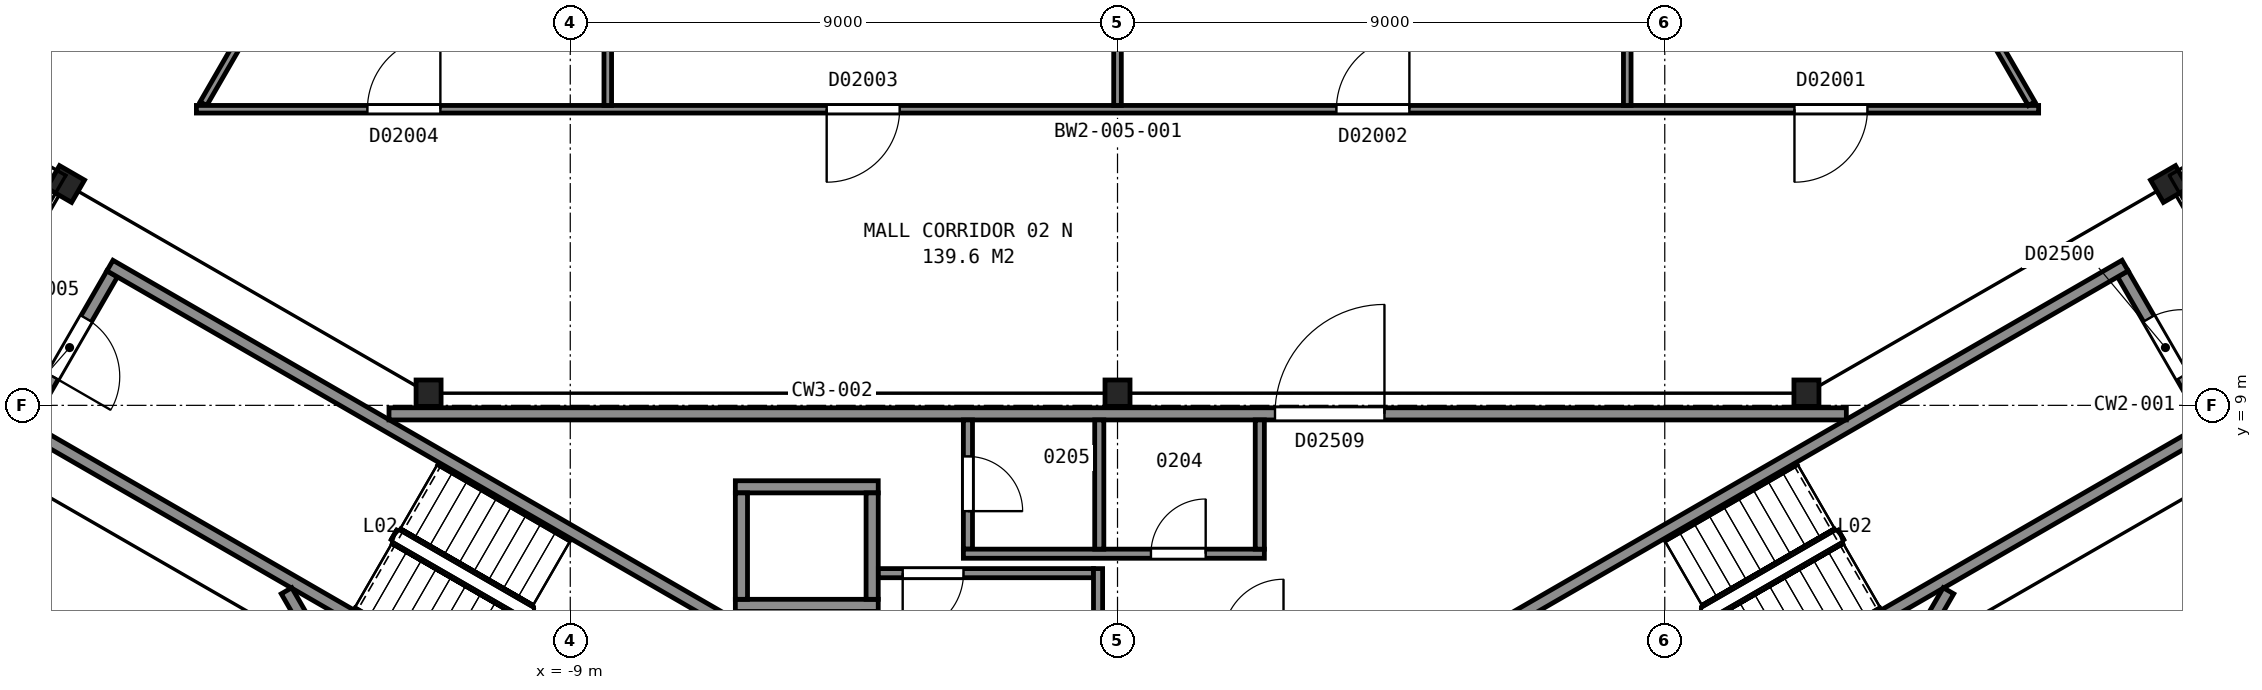
"""IFC4 building model, lengths in metres.
Left out: names, types, materials, properties, quantities, classifications, styles, units other than length and angle.
Written with IfcOpenShell. Run it as: python <this file> out.ifc"""

import sys

from ifc_helpers import new_model, si_unit, direction, frame, frame_2d, origin, origin_2d, place, context, subcontext, project, spatial, rectangle, i_section, extrude, element, fill, save


model = new_model("IFC4")
c1 = context("Model", 3, precision=1e-05, world=origin(), true_north=direction((0.0, 1.0)))
c2 = subcontext(c1, "Body", "Model", "MODEL_VIEW")
j1 = project(units=[si_unit("LENGTHUNIT", "METRE"), si_unit("PLANEANGLEUNIT", "RADIAN")], contexts=[c1])
p1 = place(None, origin())
s1 = spatial("IfcSite", under=j1, at=p1, CompositionType="ELEMENT")
p2 = place(p1, origin())
s2 = spatial("IfcBuilding", under=s1, at=p2, CompositionType="ELEMENT")
p3 = place(p2, frame((0.0, 0.0, 17.4)))
s3 = spatial("IfcBuildingStorey", under=s2, at=p3, CompositionType="ELEMENT", Elevation=17.4)
p4 = place(p3, frame((17.3, 12.64, 0.0), z_axis=(0.0, 0.0, 1.0), x_axis=(0.5, -0.866025403784, 0.0)))
e1 = element("IfcColumn", 1, at=p4, inside=s3, PredefinedType="COLUMN", context=c2, shape_type="SweptSolid", body=[
    extrude(i_section(OverallWidth=0.424, OverallDepth=0.475, WebThickness=0.048, FlangeThickness=0.077, FilletRadius=0.015, at=origin_2d()), origin(), (0.0, 0.0, 1.0), 5.0),
])
for number, where, z_axis, x_axis in (
    (2, (11.33, 9.2, 0.0), (0.0, 0.0, 1.0), (1.0, 0.0, 0.0)),
    (3, (0.0, 9.2, 0.0), (0.0, 0.0, 1.0), (1.0, 0.0, 0.0)),
    (4, (-11.33, 9.2, 0.0), (0.0, 0.0, 1.0), (1.0, 0.0, 0.0)),
):
    element("IfcColumn", number, at=place(p3, frame(where, z_axis=z_axis, x_axis=x_axis)), inside=s3, PredefinedType="COLUMN", context=c2, shape_type="SweptSolid", body=[
        extrude(i_section(OverallWidth=0.411, OverallDepth=0.434, WebThickness=0.036, FlangeThickness=0.057, FilletRadius=0.015, at=origin_2d()), origin(), (0.0, 0.0, 1.0), 5.0),
    ])
p5 = place(p3, frame((-17.3, 12.64, 0.0), z_axis=(0.0, 0.0, 1.0), x_axis=(0.5, 0.866025403784, 0.0)))
e5 = element("IfcColumn", 5, at=p5, inside=s3, PredefinedType="COLUMN", context=c2, shape_type="SweptSolid", body=[
    extrude(i_section(OverallWidth=0.424, OverallDepth=0.475, WebThickness=0.048, FlangeThickness=0.077, FilletRadius=0.015, at=origin_2d()), origin(), (0.0, 0.0, 1.0), 5.0),
])
p6 = place(p3, frame((17.934, 8.738, 0.0), z_axis=(0.0, 0.0, 1.0), x_axis=(-0.49998411664, 0.866034573852, 0.0)))
e6 = element("IfcWall", 6, at=p6, inside=s3, PredefinedType="PARTITIONING", context=c2, shape_type="SweptSolid", body=[
    extrude(rectangle(XDim=2.8, YDim=0.2, at=frame_2d((1.4, 0.0))), origin(), (0.0, 0.0, 1.0), 4.75),
])
p7 = place(p6, frame((0.85, 0.0, 0.0)))
e7 = element("IfcOpeningElement", 7, at=p7, cuts=e6, PredefinedType="OPENING", context=c2, shape_type="SweptSolid", body=[
    extrude(rectangle(XDim=1.1, YDim=2.1, at=frame_2d((0.55, 1.05))), frame((0.0, 0.11, 0.0), z_axis=(0.0, -1.0, 0.0), x_axis=(1.0, 0.0, 0.0)), (0.0, 0.0, 1.0), 0.22),
])
for number, where, z_axis, x_axis in (
    (8, (6.178, 5.299, 0.0), (0.0, 0.0, 1.0), (0.866, 0.5, 0.0)),
    (9, (7.678, 2.701, 0.0), (0.0, 0.0, 1.0), (0.866, 0.5, 0.0)),
):
    element("IfcWall", number, at=place(p3, frame(where, z_axis=z_axis, x_axis=x_axis)), inside=s3, PredefinedType="PARTITIONING", context=c2, shape_type="SweptSolid", body=[
        extrude(rectangle(XDim=12.0, YDim=0.2, at=frame_2d((6.0, 0.0))), origin(), (0.0, 0.0, 1.0), 4.75),
    ])
p8 = place(p3, frame((-16.534, 11.162, 0.0), z_axis=(0.0, 0.0, 1.0), x_axis=(-0.49998411664, -0.866034573852, 0.0)))
e10 = element("IfcWall", 10, at=p8, inside=s3, PredefinedType="PARTITIONING", context=c2, shape_type="SweptSolid", body=[
    extrude(rectangle(XDim=2.8, YDim=0.2, at=frame_2d((1.4, 0.0))), origin(), (0.0, 0.0, 1.0), 4.75),
])
p9 = place(p8, frame((0.85, 0.0, 0.0)))
e11 = element("IfcOpeningElement", 11, at=p9, cuts=e10, PredefinedType="OPENING", context=c2, shape_type="SweptSolid", body=[
    extrude(rectangle(XDim=1.1, YDim=2.1, at=frame_2d((0.55, 1.05))), frame((0.0, 0.11, 0.0), z_axis=(0.0, -1.0, 0.0), x_axis=(1.0, 0.0, 0.0)), (0.0, 0.0, 1.0), 0.22),
])
for number, where, z_axis, x_axis in (
    (12, (-7.678, 2.701, 0.0), (0.0, 0.0, 1.0), (-0.866, 0.5, 0.0)),
    (13, (-6.178, 5.299, 0.0), (0.0, 0.0, 1.0), (-0.866, 0.5, 0.0)),
):
    element("IfcWall", number, at=place(p3, frame(where, z_axis=z_axis, x_axis=x_axis)), inside=s3, PredefinedType="PARTITIONING", context=c2, shape_type="SweptSolid", body=[
        extrude(rectangle(XDim=12.0, YDim=0.2, at=frame_2d((6.0, 0.0))), origin(), (0.0, 0.0, 1.0), 4.75),
    ])
for number, where, z_axis, x_axis in (
    (14, (-6.285, 5.71, 0.0), (0.0, 0.0, 1.0), (1.0, 0.0, 0.0)),
    (15, (-6.285, 7.66, 0.0), (0.0, 0.0, 1.0), (1.0, 0.0, 0.0)),
):
    element("IfcWall", number, at=place(p3, frame(where, z_axis=z_axis, x_axis=x_axis)), inside=s3, PredefinedType="PARTITIONING", context=c2, shape_type="SweptSolid", body=[
        extrude(rectangle(XDim=2.35, YDim=0.2, at=frame_2d((1.175, 0.0))), origin(), (0.0, 0.0, 1.0), 5.0),
    ])
for number, where, z_axis, x_axis in (
    (16, (-4.035, 5.81, 0.0), (0.0, 0.0, 1.0), (0.0, 1.0, 0.0)),
    (17, (-6.185, 5.81, 0.0), (0.0, 0.0, 1.0), (0.0, 1.0, 0.0)),
):
    element("IfcWall", number, at=place(p3, frame(where, z_axis=z_axis, x_axis=x_axis)), inside=s3, PredefinedType="PARTITIONING", context=c2, shape_type="SweptSolid", body=[
        extrude(rectangle(XDim=1.75, YDim=0.2, at=frame_2d((0.875, 0.0))), origin(), (0.0, 0.0, 1.0), 5.0),
    ])
p10 = place(p3, frame((-13.666, 5.95, 0.0), z_axis=(0.0, 0.0, 1.0), x_axis=(0.499971736997, -0.866041720822, 0.0)))
e18 = element("IfcWall", 18, at=p10, inside=s3, PredefinedType="PARTITIONING", context=c2, shape_type="SweptSolid", body=[
    extrude(rectangle(XDim=14.949, YDim=0.2, at=frame_2d((7.475, 0.0))), origin(), (0.0, 0.0, 1.0), 4.75),
])
p11 = place(p10, frame((8.69, 0.0, 0.0)))
e19 = element("IfcOpeningElement", 19, at=p11, cuts=e18, PredefinedType="OPENING", context=c2, shape_type="SweptSolid", body=[
    extrude(rectangle(XDim=1.8, YDim=2.1, at=frame_2d((0.9, 1.05))), frame((0.0, 0.11, 0.0), z_axis=(0.0, -1.0, 0.0), x_axis=(1.0, 0.0, 0.0)), (0.0, 0.0, 1.0), 0.22),
])
p12 = place(p3, frame((11.986, 8.86, 0.0), z_axis=(0.0, 0.0, 1.0), x_axis=(-1.0, 0.0, 0.0)))
e20 = element("IfcWall", 20, at=p12, inside=s3, PredefinedType="PARTITIONING", context=c2, shape_type="SweptSolid", body=[
    extrude(rectangle(XDim=23.967, YDim=0.2, at=frame_2d((11.983, 0.0))), origin(), (0.0, 0.0, 1.0), 4.75),
])
p13 = place(p12, frame((7.596, 0.0, 0.0)))
e21 = element("IfcOpeningElement", 21, at=p13, cuts=e20, PredefinedType="OPENING", context=c2, shape_type="SweptSolid", body=[
    extrude(rectangle(XDim=1.8, YDim=2.1, at=frame_2d((0.9, 1.05))), frame((0.0, 0.11, 0.0), z_axis=(0.0, -1.0, 0.0), x_axis=(1.0, 0.0, 0.0)), (0.0, 0.0, 1.0), 0.22),
])
p14 = place(p3, frame((-3.933, 6.24, 0.0), z_axis=(0.0, 0.0, 1.0), x_axis=(1.0, 0.0, 0.0)))
e22 = element("IfcWall", 22, at=p14, inside=s3, PredefinedType="PARTITIONING", context=c2, shape_type="SweptSolid", body=[
    extrude(rectangle(XDim=3.538, YDim=0.15, at=frame_2d((1.769, 0.0))), origin(), (0.0, 0.0, 1.0), 4.75),
])
p15 = place(p14, frame((0.4, 0.0, 0.0)))
e23 = element("IfcOpeningElement", 23, at=p15, cuts=e22, PredefinedType="OPENING", context=c2, shape_type="SweptSolid", body=[
    extrude(rectangle(XDim=1.0, YDim=2.1, at=frame_2d((0.5, 1.05))), frame((0.0, 0.085, 0.0), z_axis=(0.0, -1.0, 0.0), x_axis=(1.0, 0.0, 0.0)), (0.0, 0.0, 1.0), 0.17),
])
p16 = place(p3, frame((-2.46, 8.76, 0.0), z_axis=(0.0, 0.0, 1.0), x_axis=(0.0, -1.0, 0.0)))
e24 = element("IfcWall", 24, at=p16, inside=s3, PredefinedType="PARTITIONING", context=c2, shape_type="SweptSolid", body=[
    extrude(rectangle(XDim=2.125, YDim=0.15, at=frame_2d((1.062, 0.0))), origin(), (0.0, 0.0, 1.0), 4.75),
])
p17 = place(p16, frame((0.6, 0.0, 0.0)))
e25 = element("IfcOpeningElement", 25, at=p17, cuts=e24, PredefinedType="OPENING", context=c2, shape_type="SweptSolid", body=[
    extrude(rectangle(XDim=0.9, YDim=2.1, at=frame_2d((0.45, 1.05))), frame((0.0, 0.085, 0.0), z_axis=(0.0, -1.0, 0.0), x_axis=(1.0, 0.0, 0.0)), (0.0, 0.0, 1.0), 0.17),
])
p18 = place(p3, frame((-2.535, 6.56, 0.0), z_axis=(0.0, 0.0, 1.0), x_axis=(1.0, 0.0, 0.0)))
e26 = element("IfcWall", 26, at=p18, inside=s3, PredefinedType="PARTITIONING", context=c2, shape_type="SweptSolid", body=[
    extrude(rectangle(XDim=4.95, YDim=0.15, at=frame_2d((2.475, 0.0))), origin(), (0.0, 0.0, 1.0), 4.75),
])
p19 = place(p18, frame((3.085, 0.0, 0.0)))
e27 = element("IfcOpeningElement", 27, at=p19, cuts=e26, PredefinedType="OPENING", context=c2, shape_type="SweptSolid", body=[
    extrude(rectangle(XDim=0.9, YDim=2.1, at=frame_2d((0.45, 1.05))), frame((0.0, 0.085, 0.0), z_axis=(0.0, -1.0, 0.0), x_axis=(1.0, 0.0, 0.0)), (0.0, 0.0, 1.0), 0.17),
])
p20 = place(p3, frame((-0.32, 2.252, 0.0), z_axis=(0.0, 0.0, 1.0), x_axis=(0.0, 1.0, 0.0)))
e28 = element("IfcWall", 28, at=p20, inside=s3, PredefinedType="PARTITIONING", context=c2, shape_type="SweptSolid", body=[
    extrude(rectangle(XDim=4.063, YDim=0.15, at=frame_2d((2.031, 0.0))), origin(), (0.0, 0.0, 1.0), 4.75),
])
for number, where, z_axis, x_axis in (
    (29, (-0.3, 6.635, 0.0), (0.0, 0.0, 1.0), (0.0, 1.0, 0.0)),
    (30, (2.34, 6.635, 0.0), (0.0, 0.0, 1.0), (0.0, 1.0, 0.0)),
):
    element("IfcWall", number, at=place(p3, frame(where, z_axis=z_axis, x_axis=x_axis)), inside=s3, PredefinedType="PARTITIONING", context=c2, shape_type="SweptSolid", body=[
        extrude(rectangle(XDim=2.125, YDim=0.15, at=frame_2d((1.062, 0.0))), origin(), (0.0, 0.0, 1.0), 4.75),
    ])
p21 = place(p3, frame((3.703, -11.306, 0.0), z_axis=(0.0, 0.0, 1.0), x_axis=(0.500006692285, 0.866021539957, 0.0)))
e31 = element("IfcWall", 31, at=p21, inside=s3, PredefinedType="PARTITIONING", context=c2, shape_type="SweptSolid", body=[
    extrude(rectangle(XDim=19.926, YDim=0.2, at=frame_2d((9.963, 0.0))), origin(), (0.0, 0.0, 1.0), 4.75),
])
p22 = place(p21, frame((9.4, 0.0, 0.0)))
e32 = element("IfcOpeningElement", 32, at=p22, cuts=e31, PredefinedType="OPENING", context=c2, shape_type="SweptSolid", body=[
    extrude(rectangle(XDim=1.8, YDim=2.1, at=frame_2d((0.9, 1.05))), frame((0.0, 0.11, 0.0), z_axis=(0.0, -1.0, 0.0), x_axis=(1.0, 0.0, 0.0)), (0.0, 0.0, 1.0), 0.22),
])
p23 = place(p3, frame((-4.438, -20.054, 0.0), z_axis=(0.0, 0.0, 1.0), x_axis=(-0.499994028088, 0.866028851642, 0.0)))
e33 = element("IfcWall", 33, at=p23, inside=s3, PredefinedType="PARTITIONING", context=c2, shape_type="SweptSolid", body=[
    extrude(rectangle(XDim=30.297, YDim=0.125, at=frame_2d((15.148, 0.0))), origin(), (0.0, 0.0, 1.0), 3.853),
])
p24 = place(p23, frame((10.349, 0.0, 0.0)))
e34 = element("IfcOpeningElement", 34, at=p24, cuts=e33, PredefinedType="OPENING", context=c2, shape_type="SweptSolid", body=[
    extrude(rectangle(XDim=1.2, YDim=2.1, at=frame_2d((0.6, 1.05))), frame((0.0, 0.073, 0.0), z_axis=(0.0, -1.0, 0.0), x_axis=(1.0, 0.0, 0.0)), (0.0, 0.0, 1.0), 0.145),
])
p25 = place(p23, frame((2.916, 0.0, 0.0)))
e35 = element("IfcOpeningElement", 35, at=p25, cuts=e33, PredefinedType="OPENING", context=c2, shape_type="SweptSolid", body=[
    extrude(rectangle(XDim=1.0, YDim=2.1, at=frame_2d((0.5, 1.05))), frame((0.0, 0.073, 0.0), z_axis=(0.0, -1.0, 0.0), x_axis=(1.0, 0.0, 0.0)), (0.0, 0.0, 1.0), 0.145),
])
p26 = place(p3, frame((-15.033, 13.961, 0.0), z_axis=(0.0, 0.0, 1.0), x_axis=(0.499977739203, 0.86603825568, 0.0)))
e36 = element("IfcWall", 36, at=p26, inside=s3, PredefinedType="PARTITIONING", context=c2, shape_type="SweptSolid", body=[
    extrude(rectangle(XDim=7.285, YDim=0.125, at=frame_2d((3.643, 0.0))), origin(), (0.0, 0.0, 1.0), 4.84),
])
p27 = place(p3, frame((-15.148, 13.87, 0.0), z_axis=(0.0, 0.0, 1.0), x_axis=(1.0, 0.0, 0.0)))
e37 = element("IfcWall", 37, at=p27, inside=s3, PredefinedType="PARTITIONING", context=c2, shape_type="SweptSolid", body=[
    extrude(rectangle(XDim=30.297, YDim=0.125, at=frame_2d((15.148, 0.0))), origin(), (0.0, 0.0, 1.0), 3.853),
])
p28 = place(p27, frame((26.281, 0.0, 0.0)))
e38 = element("IfcOpeningElement", 38, at=p28, cuts=e37, PredefinedType="OPENING", context=c2, shape_type="SweptSolid", body=[
    extrude(rectangle(XDim=1.2, YDim=2.1, at=frame_2d((0.6, 1.05))), frame((0.0, 0.073, 0.0), z_axis=(0.0, -1.0, 0.0), x_axis=(1.0, 0.0, 0.0)), (0.0, 0.0, 1.0), 0.145),
])
p29 = place(p27, frame((18.749, 0.0, 0.0)))
e39 = element("IfcOpeningElement", 39, at=p29, cuts=e37, PredefinedType="OPENING", context=c2, shape_type="SweptSolid", body=[
    extrude(rectangle(XDim=1.2, YDim=2.1, at=frame_2d((0.6, 1.05))), frame((0.0, 0.073, 0.0), z_axis=(0.0, -1.0, 0.0), x_axis=(1.0, 0.0, 0.0)), (0.0, 0.0, 1.0), 0.145),
])
p30 = place(p27, frame((10.365, 0.0, 0.0)))
e40 = element("IfcOpeningElement", 40, at=p30, cuts=e37, PredefinedType="OPENING", context=c2, shape_type="SweptSolid", body=[
    extrude(rectangle(XDim=1.2, YDim=2.1, at=frame_2d((0.6, 1.05))), frame((0.0, 0.073, 0.0), z_axis=(0.0, -1.0, 0.0), x_axis=(1.0, 0.0, 0.0)), (0.0, 0.0, 1.0), 0.145),
])
p31 = place(p27, frame((2.812, 0.0, 0.0)))
e41 = element("IfcOpeningElement", 41, at=p31, cuts=e37, PredefinedType="OPENING", context=c2, shape_type="SweptSolid", body=[
    extrude(rectangle(XDim=1.2, YDim=2.1, at=frame_2d((0.6, 1.05))), frame((0.0, 0.073, 0.0), z_axis=(0.0, -1.0, 0.0), x_axis=(1.0, 0.0, 0.0)), (0.0, 0.0, 1.0), 0.145),
])
for number, where, z_axis, x_axis in (
    (42, (-8.383, 13.933, 0.0), (0.0, 0.0, 1.0), (0.0, 1.0, 0.0)),
    (43, (0.0, 13.933, 0.0), (0.0, 0.0, 1.0), (0.0, 1.0, 0.0)),
):
    element("IfcWall", number, at=place(p3, frame(where, z_axis=z_axis, x_axis=x_axis)), inside=s3, PredefinedType="PARTITIONING", context=c2, shape_type="SweptSolid", body=[
        extrude(rectangle(XDim=6.337, YDim=0.125, at=frame_2d((3.169, 0.0))), origin(), (0.0, 0.0, 1.0), 3.853),
    ])
p32 = place(p3, frame((19.586, 6.184, 0.0), z_axis=(0.0, 0.0, 1.0), x_axis=(-0.499994028088, -0.866028851642, 0.0)))
e44 = element("IfcWall", 44, at=p32, inside=s3, PredefinedType="PARTITIONING", context=c2, shape_type="SweptSolid", body=[
    extrude(rectangle(XDim=30.297, YDim=0.125, at=frame_2d((15.148, 0.0))), origin(), (0.0, 0.0, 1.0), 3.853),
])
p33 = place(p32, frame((26.285, 0.0, 0.0)))
e45 = element("IfcOpeningElement", 45, at=p33, cuts=e44, PredefinedType="OPENING", context=c2, shape_type="SweptSolid", body=[
    extrude(rectangle(XDim=1.2, YDim=2.1, at=frame_2d((0.6, 1.05))), frame((0.0, 0.073, 0.0), z_axis=(0.0, -1.0, 0.0), x_axis=(1.0, 0.0, 0.0)), (0.0, 0.0, 1.0), 0.145),
])
p34 = place(p32, frame((18.832, 0.0, 0.0)))
e46 = element("IfcOpeningElement", 46, at=p34, cuts=e44, PredefinedType="OPENING", context=c2, shape_type="SweptSolid", body=[
    extrude(rectangle(XDim=1.0, YDim=2.1, at=frame_2d((0.5, 1.05))), frame((0.0, 0.073, 0.0), z_axis=(0.0, -1.0, 0.0), x_axis=(1.0, 0.0, 0.0)), (0.0, 0.0, 1.0), 0.145),
])
p35 = place(p32, frame((10.349, 0.0, 0.0)))
e47 = element("IfcOpeningElement", 47, at=p35, cuts=e44, PredefinedType="OPENING", context=c2, shape_type="SweptSolid", body=[
    extrude(rectangle(XDim=1.2, YDim=2.1, at=frame_2d((0.6, 1.05))), frame((0.0, 0.073, 0.0), z_axis=(0.0, -1.0, 0.0), x_axis=(1.0, 0.0, 0.0)), (0.0, 0.0, 1.0), 0.145),
])
p36 = place(p32, frame((2.817, 0.0, 0.0)))
e48 = element("IfcOpeningElement", 48, at=p36, cuts=e44, PredefinedType="OPENING", context=c2, shape_type="SweptSolid", body=[
    extrude(rectangle(XDim=1.2, YDim=2.1, at=frame_2d((0.6, 1.05))), frame((0.0, 0.073, 0.0), z_axis=(0.0, -1.0, 0.0), x_axis=(1.0, 0.0, 0.0)), (0.0, 0.0, 1.0), 0.145),
])
p37 = place(p3, frame((8.383, 13.933, 0.0), z_axis=(0.0, 0.0, 1.0), x_axis=(0.0, 1.0, 0.0)))
e49 = element("IfcWall", 49, at=p37, inside=s3, PredefinedType="PARTITIONING", context=c2, shape_type="SweptSolid", body=[
    extrude(rectangle(XDim=6.337, YDim=0.125, at=frame_2d((3.169, 0.0))), origin(), (0.0, 0.0, 1.0), 3.853),
])
p38 = place(p3, frame((11.391, 20.27, 0.0), z_axis=(0.0, 0.0, 1.0), x_axis=(0.499977739203, -0.86603825568, 0.0)))
e50 = element("IfcWall", 50, at=p38, inside=s3, PredefinedType="PARTITIONING", context=c2, shape_type="SweptSolid", body=[
    extrude(rectangle(XDim=7.285, YDim=0.125, at=frame_2d((3.643, 0.0))), origin(), (0.0, 0.0, 1.0), 4.84),
])
p39 = place(p7, origin())
e51 = element("IfcDoor", 51, at=p39, inside=s3, OperationType="SINGLE_SWING_LEFT", PredefinedType="DOOR", context=c2, shape_type="SweptSolid", body=[
    extrude(rectangle(XDim=1.1, YDim=2.1, at=frame_2d((0.55, 1.05))), frame((0.0, 0.025, 0.0), z_axis=(0.0, -1.0, 0.0), x_axis=(1.0, 0.0, 0.0)), (0.0, 0.0, 1.0), 0.05),
])
fill(e7, e51)
p40 = place(p9, origin())
e52 = element("IfcDoor", 52, at=p40, inside=s3, OperationType="SINGLE_SWING_RIGHT", PredefinedType="DOOR", context=c2, shape_type="SweptSolid", body=[
    extrude(rectangle(XDim=1.1, YDim=2.1, at=frame_2d((0.55, 1.05))), frame((0.0, 0.025, 0.0), z_axis=(0.0, -1.0, 0.0), x_axis=(1.0, 0.0, 0.0)), (0.0, 0.0, 1.0), 0.05),
])
fill(e11, e52)
p41 = place(p13, origin())
e53 = element("IfcDoor", 53, at=p41, inside=s3, OperationType="DOUBLE_DOOR_SINGLE_SWING", PredefinedType="DOOR", context=c2, shape_type="SweptSolid", body=[
    extrude(rectangle(XDim=1.8, YDim=2.1, at=frame_2d((0.9, 1.05))), frame((0.0, 0.025, 0.0), z_axis=(0.0, -1.0, 0.0), x_axis=(1.0, 0.0, 0.0)), (0.0, 0.0, 1.0), 0.05),
])
fill(e21, e53)
p42 = place(p15, origin())
e54 = element("IfcDoor", 54, at=p42, inside=s3, OperationType="SINGLE_SWING_LEFT", PredefinedType="DOOR", context=c2, shape_type="SweptSolid", body=[
    extrude(rectangle(XDim=1.0, YDim=2.1, at=frame_2d((0.5, 1.05))), frame((0.0, 0.025, 0.0), z_axis=(0.0, -1.0, 0.0), x_axis=(1.0, 0.0, 0.0)), (0.0, 0.0, 1.0), 0.05),
])
fill(e23, e54)
p43 = place(p17, origin())
e55 = element("IfcDoor", 55, at=p43, inside=s3, OperationType="SINGLE_SWING_RIGHT", PredefinedType="DOOR", context=c2, shape_type="SweptSolid", body=[
    extrude(rectangle(XDim=0.9, YDim=2.1, at=frame_2d((0.45, 1.05))), frame((0.0, 0.025, 0.0), z_axis=(0.0, -1.0, 0.0), x_axis=(1.0, 0.0, 0.0)), (0.0, 0.0, 1.0), 0.05),
])
fill(e25, e55)
p44 = place(p19, origin())
e56 = element("IfcDoor", 56, at=p44, inside=s3, OperationType="SINGLE_SWING_RIGHT", PredefinedType="DOOR", context=c2, shape_type="SweptSolid", body=[
    extrude(rectangle(XDim=0.9, YDim=2.1, at=frame_2d((0.45, 1.05))), frame((0.0, 0.025, 0.0), z_axis=(0.0, -1.0, 0.0), x_axis=(1.0, 0.0, 0.0)), (0.0, 0.0, 1.0), 0.05),
])
fill(e27, e56)
p45 = place(p28, origin())
e57 = element("IfcDoor", 57, at=p45, inside=s3, OperationType="SINGLE_SWING_LEFT", PredefinedType="DOOR", context=c2, shape_type="SweptSolid", body=[
    extrude(rectangle(XDim=1.2, YDim=2.1, at=frame_2d((0.6, 1.05))), frame((0.0, 0.025, 0.0), z_axis=(0.0, -1.0, 0.0), x_axis=(1.0, 0.0, 0.0)), (0.0, 0.0, 1.0), 0.05),
])
fill(e38, e57)
p46 = place(p29, origin())
e58 = element("IfcDoor", 58, at=p46, inside=s3, OperationType="SINGLE_SWING_RIGHT", PredefinedType="DOOR", context=c2, shape_type="SweptSolid", body=[
    extrude(rectangle(XDim=1.2, YDim=2.1, at=frame_2d((0.6, 1.05))), frame((0.0, 0.025, 0.0), z_axis=(0.0, -1.0, 0.0), x_axis=(1.0, 0.0, 0.0)), (0.0, 0.0, 1.0), 0.05),
])
fill(e39, e58)
p47 = place(p30, origin())
e59 = element("IfcDoor", 59, at=p47, inside=s3, OperationType="SINGLE_SWING_LEFT", PredefinedType="DOOR", context=c2, shape_type="SweptSolid", body=[
    extrude(rectangle(XDim=1.2, YDim=2.1, at=frame_2d((0.6, 1.05))), frame((0.0, 0.025, 0.0), z_axis=(0.0, -1.0, 0.0), x_axis=(1.0, 0.0, 0.0)), (0.0, 0.0, 1.0), 0.05),
])
fill(e40, e59)
p48 = place(p31, origin())
e60 = element("IfcDoor", 60, at=p48, inside=s3, OperationType="SINGLE_SWING_RIGHT", PredefinedType="DOOR", context=c2, shape_type="SweptSolid", body=[
    extrude(rectangle(XDim=1.2, YDim=2.1, at=frame_2d((0.6, 1.05))), frame((0.0, 0.025, 0.0), z_axis=(0.0, -1.0, 0.0), x_axis=(1.0, 0.0, 0.0)), (0.0, 0.0, 1.0), 0.05),
])
fill(e41, e60)
save(model, sys.argv[1])
